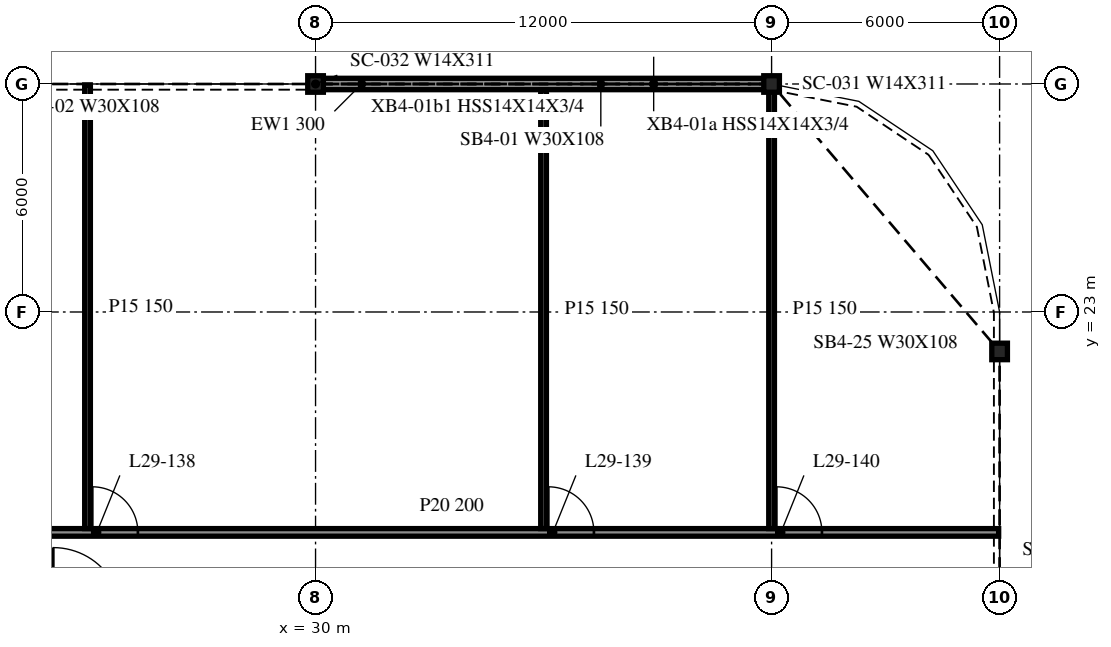
"""IFC4 building model, lengths in metres.
Left out: names, types, materials, properties, quantities, classifications, styles, units other than length and angle.
Written with IfcOpenShell. Run it as: python <this file> out.ifc"""

import sys

from ifc_helpers import new_model, si_unit, direction, frame, frame_2d, origin, origin_2d, place, context, subcontext, project, spatial, rectangle, i_section, extrude, element, fill, save


model = new_model("IFC4")
c1 = context("Model", 3, precision=1e-05, world=origin(), true_north=direction((0.0, 1.0)))
c2 = subcontext(c1, "Body", "Model", "MODEL_VIEW")
j1 = project(units=[si_unit("LENGTHUNIT", "METRE"), si_unit("PLANEANGLEUNIT", "RADIAN")], contexts=[c1])
p1 = place(None, origin())
s1 = spatial("IfcSite", under=j1, at=p1, CompositionType="ELEMENT")
p2 = place(p1, origin())
s2 = spatial("IfcBuilding", under=s1, at=p2, CompositionType="ELEMENT")
p3 = place(p2, frame((0.0, 0.0, 126.1)))
s3 = spatial("IfcBuildingStorey", under=s2, at=p3, CompositionType="ELEMENT", Elevation=126.1)
for number, where, z_axis, x_axis in (
    (1, (42.0, 29.0, -0.34), (0.0, 0.0, 1.0), (1.0, 0.0, 0.0)),
    (2, (30.0, 29.0, -0.34), (0.0, 0.0, 1.0), (1.0, 0.0, 0.0)),
    (3, (48.0, 21.962, -0.34), (0.0, 0.0, 1.0), (1.0, 0.0, 0.0)),
):
    element("IfcColumn", number, at=place(p3, frame(where, z_axis=z_axis, x_axis=x_axis)), inside=s3, PredefinedType="COLUMN", context=c2, shape_type="SweptSolid", body=[
        extrude(i_section(OverallWidth=0.412, OverallDepth=0.434, WebThickness=0.036, FlangeThickness=0.057, at=origin_2d()), origin(), (0.0, 0.0, 1.0), 4.1),
    ])
p4 = place(p3, frame((41.982, 29.0, 0.0), z_axis=(0.0, 0.0, 1.0), x_axis=(-1.0, 0.0, 0.0)))
e4 = element("IfcWall", 4, at=p4, inside=s3, PredefinedType="NOTDEFINED", context=c2, shape_type="SweptSolid", body=[
    extrude(rectangle(XDim=11.964, YDim=0.3, at=frame_2d((5.982, 0.0))), origin(), (0.0, 0.0, 1.0), 3.003),
])
p5 = place(p3, frame((-47.975, 17.2, 0.0), z_axis=(0.0, 0.0, 1.0), x_axis=(1.0, 0.0, 0.0)))
e5 = element("IfcWall", 5, at=p5, inside=s3, PredefinedType="PARTITIONING", context=c2, shape_type="SweptSolid", body=[
    extrude(rectangle(XDim=95.95, YDim=0.2, at=frame_2d((47.975, 0.0))), origin(), (0.0, 0.0, 1.0), 3.76),
])
p6 = place(p5, frame((10.3, 0.0, 0.0)))
e6 = element("IfcOpeningElement", 6, at=p6, cuts=e5, PredefinedType="OPENING", context=c2, shape_type="SweptSolid", body=[
    extrude(rectangle(XDim=1.2, YDim=2.1, at=frame_2d((0.6, 1.05))), frame((0.0, 0.11, 0.0), z_axis=(0.0, -1.0, 0.0), x_axis=(1.0, 0.0, 0.0)), (0.0, 0.0, 1.0), 0.22),
])
p7 = place(p5, frame((16.3, 0.0, 0.0)))
e7 = element("IfcOpeningElement", 7, at=p7, cuts=e5, PredefinedType="OPENING", context=c2, shape_type="SweptSolid", body=[
    extrude(rectangle(XDim=1.2, YDim=2.1, at=frame_2d((0.6, 1.05))), frame((0.0, 0.11, 0.0), z_axis=(0.0, -1.0, 0.0), x_axis=(1.0, 0.0, 0.0)), (0.0, 0.0, 1.0), 0.22),
])
p8 = place(p5, frame((22.3, 0.0, 0.0)))
e8 = element("IfcOpeningElement", 8, at=p8, cuts=e5, PredefinedType="OPENING", context=c2, shape_type="SweptSolid", body=[
    extrude(rectangle(XDim=1.2, YDim=2.1, at=frame_2d((0.6, 1.05))), frame((0.0, 0.11, 0.0), z_axis=(0.0, -1.0, 0.0), x_axis=(1.0, 0.0, 0.0)), (0.0, 0.0, 1.0), 0.22),
])
p9 = place(p5, frame((25.5, 0.0, 0.0)))
e9 = element("IfcOpeningElement", 9, at=p9, cuts=e5, PredefinedType="OPENING", context=c2, shape_type="SweptSolid", body=[
    extrude(rectangle(XDim=1.0, YDim=2.1, at=frame_2d((0.5, 1.05))), frame((0.0, 0.11, 0.0), z_axis=(0.0, -1.0, 0.0), x_axis=(1.0, 0.0, 0.0)), (0.0, 0.0, 1.0), 0.22),
])
p10 = place(p5, frame((28.3, 0.0, 0.0)))
e10 = element("IfcOpeningElement", 10, at=p10, cuts=e5, PredefinedType="OPENING", context=c2, shape_type="SweptSolid", body=[
    extrude(rectangle(XDim=1.2, YDim=2.1, at=frame_2d((0.6, 1.05))), frame((0.0, 0.11, 0.0), z_axis=(0.0, -1.0, 0.0), x_axis=(1.0, 0.0, 0.0)), (0.0, 0.0, 1.0), 0.22),
])
p11 = place(p5, frame((34.5, 0.0, 0.0)))
e11 = element("IfcOpeningElement", 11, at=p11, cuts=e5, PredefinedType="OPENING", context=c2, shape_type="SweptSolid", body=[
    extrude(rectangle(XDim=1.0, YDim=2.1, at=frame_2d((0.5, 1.05))), frame((0.0, 0.11, 0.0), z_axis=(0.0, -1.0, 0.0), x_axis=(1.0, 0.0, 0.0)), (0.0, 0.0, 1.0), 0.22),
])
p12 = place(p5, frame((46.3, 0.0, 0.0)))
e12 = element("IfcOpeningElement", 12, at=p12, cuts=e5, PredefinedType="OPENING", context=c2, shape_type="SweptSolid", body=[
    extrude(rectangle(XDim=1.2, YDim=2.1, at=frame_2d((0.6, 1.05))), frame((0.0, 0.11, 0.0), z_axis=(0.0, -1.0, 0.0), x_axis=(1.0, 0.0, 0.0)), (0.0, 0.0, 1.0), 0.22),
])
p13 = place(p5, frame((48.1, 0.0, 0.0)))
e13 = element("IfcOpeningElement", 13, at=p13, cuts=e5, PredefinedType="OPENING", context=c2, shape_type="SweptSolid", body=[
    extrude(rectangle(XDim=1.2, YDim=2.1, at=frame_2d((0.6, 1.05))), frame((0.0, 0.11, 0.0), z_axis=(0.0, -1.0, 0.0), x_axis=(1.0, 0.0, 0.0)), (0.0, 0.0, 1.0), 0.22),
])
p14 = place(p5, frame((54.1, 0.0, 0.0)))
e14 = element("IfcOpeningElement", 14, at=p14, cuts=e5, PredefinedType="OPENING", context=c2, shape_type="SweptSolid", body=[
    extrude(rectangle(XDim=1.2, YDim=2.1, at=frame_2d((0.6, 1.05))), frame((0.0, 0.11, 0.0), z_axis=(0.0, -1.0, 0.0), x_axis=(1.0, 0.0, 0.0)), (0.0, 0.0, 1.0), 0.22),
])
p15 = place(p5, frame((60.1, 0.0, 0.0)))
e15 = element("IfcOpeningElement", 15, at=p15, cuts=e5, PredefinedType="OPENING", context=c2, shape_type="SweptSolid", body=[
    extrude(rectangle(XDim=1.0, YDim=2.1, at=frame_2d((0.5, 1.05))), frame((0.0, 0.11, 0.0), z_axis=(0.0, -1.0, 0.0), x_axis=(1.0, 0.0, 0.0)), (0.0, 0.0, 1.0), 0.22),
])
p16 = place(p5, frame((63.1, 0.0, 0.0)))
e16 = element("IfcOpeningElement", 16, at=p16, cuts=e5, PredefinedType="OPENING", context=c2, shape_type="SweptSolid", body=[
    extrude(rectangle(XDim=1.2, YDim=2.1, at=frame_2d((0.6, 1.05))), frame((0.0, 0.11, 0.0), z_axis=(0.0, -1.0, 0.0), x_axis=(1.0, 0.0, 0.0)), (0.0, 0.0, 1.0), 0.22),
])
p17 = place(p5, frame((66.1, 0.0, 0.0)))
e17 = element("IfcOpeningElement", 17, at=p17, cuts=e5, PredefinedType="OPENING", context=c2, shape_type="SweptSolid", body=[
    extrude(rectangle(XDim=1.0, YDim=2.1, at=frame_2d((0.5, 1.05))), frame((0.0, 0.11, 0.0), z_axis=(0.0, -1.0, 0.0), x_axis=(1.0, 0.0, 0.0)), (0.0, 0.0, 1.0), 0.22),
])
p18 = place(p5, frame((72.1, 0.0, 0.0)))
e18 = element("IfcOpeningElement", 18, at=p18, cuts=e5, PredefinedType="OPENING", context=c2, shape_type="SweptSolid", body=[
    extrude(rectangle(XDim=1.2, YDim=2.1, at=frame_2d((0.6, 1.05))), frame((0.0, 0.11, 0.0), z_axis=(0.0, -1.0, 0.0), x_axis=(1.0, 0.0, 0.0)), (0.0, 0.0, 1.0), 0.22),
])
p19 = place(p5, frame((84.1, 0.0, 0.0)))
e19 = element("IfcOpeningElement", 19, at=p19, cuts=e5, PredefinedType="OPENING", context=c2, shape_type="SweptSolid", body=[
    extrude(rectangle(XDim=1.2, YDim=2.1, at=frame_2d((0.6, 1.05))), frame((0.0, 0.11, 0.0), z_axis=(0.0, -1.0, 0.0), x_axis=(1.0, 0.0, 0.0)), (0.0, 0.0, 1.0), 0.22),
])
p20 = place(p5, frame((90.1, 0.0, 0.0)))
e20 = element("IfcOpeningElement", 20, at=p20, cuts=e5, PredefinedType="OPENING", context=c2, shape_type="SweptSolid", body=[
    extrude(rectangle(XDim=1.2, YDim=2.1, at=frame_2d((0.6, 1.05))), frame((0.0, 0.11, 0.0), z_axis=(0.0, -1.0, 0.0), x_axis=(1.0, 0.0, 0.0)), (0.0, 0.0, 1.0), 0.22),
])
p21 = place(p3, frame((24.0, 17.3, 0.0), z_axis=(0.0, 0.0, 1.0), x_axis=(0.0, 1.0, 0.0)))
e21 = element("IfcWall", 21, at=p21, inside=s3, PredefinedType="PARTITIONING", context=c2, shape_type="SweptSolid", body=[
    extrude(rectangle(XDim=11.675, YDim=0.15, at=frame_2d((5.837, 0.0))), origin(), (0.0, 0.0, 1.0), 3.76),
])
p22 = place(p3, frame((36.0, 17.3, 0.0), z_axis=(0.0, 0.0, 1.0), x_axis=(0.0, 1.0, 0.0)))
e22 = element("IfcWall", 22, at=p22, inside=s3, PredefinedType="PARTITIONING", context=c2, shape_type="SweptSolid", body=[
    extrude(rectangle(XDim=11.55, YDim=0.15, at=frame_2d((5.775, 0.0))), origin(), (0.0, 0.0, 1.0), 3.76),
])
p23 = place(p3, frame((42.0, 17.3, 0.0), z_axis=(0.0, 0.0, 1.0), x_axis=(0.0, 1.0, 0.0)))
e23 = element("IfcWall", 23, at=p23, inside=s3, PredefinedType="PARTITIONING", context=c2, shape_type="SweptSolid", body=[
    extrude(rectangle(XDim=11.547, YDim=0.15, at=frame_2d((5.773, 0.0))), origin(), (0.0, 0.0, 1.0), 3.76),
])
p24 = place(p18, origin())
e24 = element("IfcDoor", 24, at=p24, inside=s3, OperationType="SINGLE_SWING_RIGHT", PredefinedType="DOOR", context=c2, shape_type="SweptSolid", body=[
    extrude(rectangle(XDim=1.2, YDim=2.1, at=frame_2d((0.6, 1.05))), frame((0.0, 0.025, 0.0), z_axis=(0.0, -1.0, 0.0), x_axis=(1.0, 0.0, 0.0)), (0.0, 0.0, 1.0), 0.05),
])
fill(e18, e24)
p25 = place(p19, origin())
e25 = element("IfcDoor", 25, at=p25, inside=s3, OperationType="SINGLE_SWING_RIGHT", PredefinedType="DOOR", context=c2, shape_type="SweptSolid", body=[
    extrude(rectangle(XDim=1.2, YDim=2.1, at=frame_2d((0.6, 1.05))), frame((0.0, 0.025, 0.0), z_axis=(0.0, -1.0, 0.0), x_axis=(1.0, 0.0, 0.0)), (0.0, 0.0, 1.0), 0.05),
])
fill(e19, e25)
p26 = place(p20, origin())
e26 = element("IfcDoor", 26, at=p26, inside=s3, OperationType="SINGLE_SWING_RIGHT", PredefinedType="DOOR", context=c2, shape_type="SweptSolid", body=[
    extrude(rectangle(XDim=1.2, YDim=2.1, at=frame_2d((0.6, 1.05))), frame((0.0, 0.025, 0.0), z_axis=(0.0, -1.0, 0.0), x_axis=(1.0, 0.0, 0.0)), (0.0, 0.0, 1.0), 0.05),
])
fill(e20, e26)
save(model, sys.argv[1])
